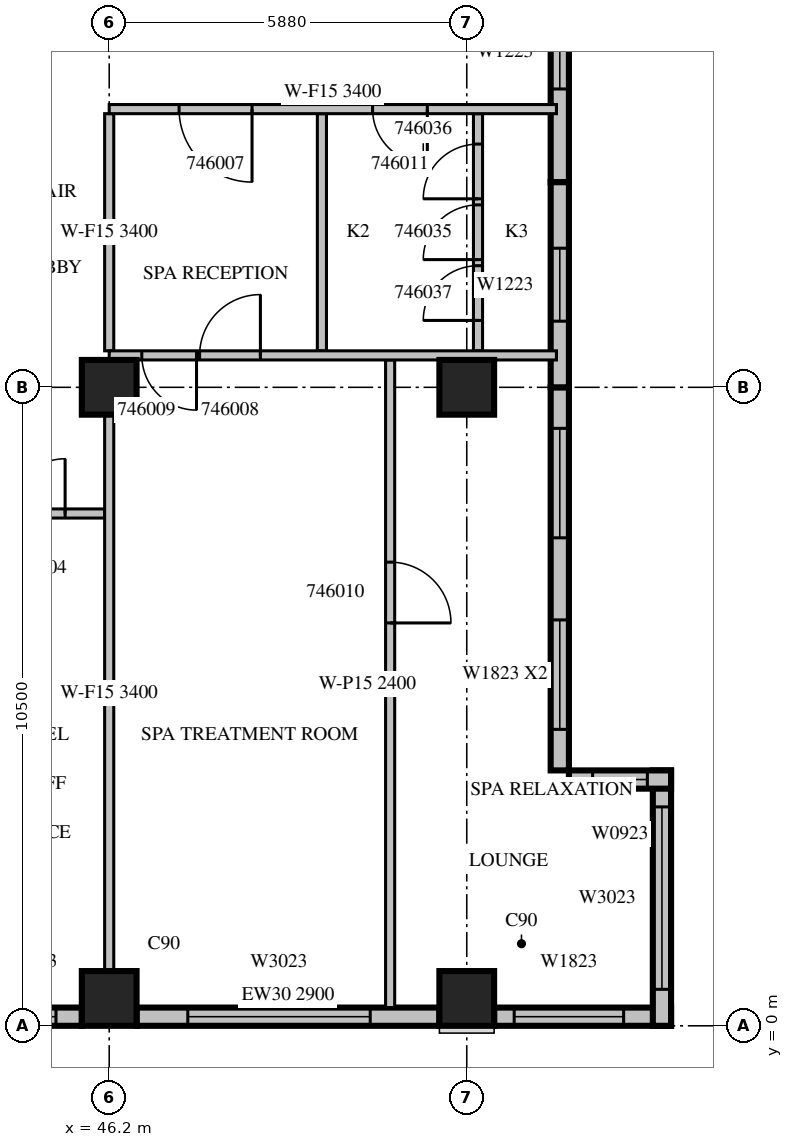
"""IFC4 building model, lengths in metres.
Left out: names, types, materials, properties, quantities, classifications, styles, units other than length and angle.
Written with IfcOpenShell. Run it as: python <this file> out.ifc"""

import sys

from ifc_helpers import new_model, si_unit, direction, frame, frame_2d, origin, origin_2d, place, context, subcontext, project, spatial, rectangle, extrude, source, transform, mapped, element, fill, save


model = new_model("IFC4")
c1 = context("Model", 3, precision=1e-05, world=origin(), true_north=direction((0.0, 1.0)))
c2 = subcontext(c1, "Body", "Model", "MODEL_VIEW")
j1 = project(units=[si_unit("LENGTHUNIT", "METRE"), si_unit("PLANEANGLEUNIT", "RADIAN")], contexts=[c1])
p1 = place(None, origin())
s1 = spatial("IfcSite", under=j1, at=p1, CompositionType="ELEMENT")
p2 = place(p1, origin())
s2 = spatial("IfcBuilding", under=s1, at=p2, CompositionType="ELEMENT")
p3 = place(p2, frame((0.0, 0.0, 208.2)))
s3 = spatial("IfcBuildingStorey", under=s2, at=p3, CompositionType="ELEMENT", Elevation=208.2)
m1 = source(origin(), c2, "Body", "SweptSolid", [
    extrude(rectangle(XDim=0.9, YDim=0.9, at=origin_2d()), origin(), (0.0, 0.0, 1.0), 3.8),
])
for number, where, z_axis, x_axis in (
    (1, (46.2, 0.45, 0.0), (0.0, 0.0, 1.0), (1.0, 0.0, 0.0)),
    (2, (52.08, 0.45, 0.0), (0.0, 0.0, 1.0), (1.0, 0.0, 0.0)),
    (3, (46.2, 10.5, 0.0), (0.0, 0.0, 1.0), (1.0, 0.0, 0.0)),
    (4, (52.08, 10.5, 0.0), (0.0, 0.0, 1.0), (1.0, 0.0, 0.0)),
):
    element("IfcColumn", number, at=place(p3, frame(where, z_axis=z_axis, x_axis=x_axis)), inside=s3, PredefinedType="COLUMN", context=c2, shape_type="MappedRepresentation", body=[
        mapped(m1, transform((0.0, 0.0, 0.0), scale=1.0)),
    ])
m2 = source(origin(), c2, "Body", "SweptSolid", [
    extrude(rectangle(XDim=1.75, YDim=0.3, at=frame_2d((0.875, 0.0))), origin(), (0.0, 0.0, 1.0), 3.4),
])
p4 = place(p3, frame((44.0, 0.15, 0.0), z_axis=(0.0, 0.0, 1.0), x_axis=(1.0, 0.0, 0.0)))
e5 = element("IfcWall", 5, at=p4, inside=s3, PredefinedType="STANDARD", context=c2, shape_type="MappedRepresentation", body=[
    mapped(m2, transform((0.0, 0.0, 0.0), scale=1.0)),
])
m3 = source(origin(), c2, "Body", "SweptSolid", [
    extrude(rectangle(XDim=0.9, YDim=2.3, at=frame_2d((0.45, 1.15))), frame((0.0, 0.16, 0.0), z_axis=(0.0, -1.0, 0.0), x_axis=(1.0, 0.0, 0.0)), (0.0, 0.0, 1.0), 0.32),
])
p5 = place(p4, frame((0.425, 0.0, 0.6)))
e6 = element("IfcOpeningElement", 6, at=p5, cuts=e5, PredefinedType="OPENING", context=c2, shape_type="MappedRepresentation", body=[
    mapped(m3, transform((0.0, 0.0, 0.0), scale=1.0)),
])
m4 = source(origin(), c2, "Body", "SweptSolid", [
    extrude(rectangle(XDim=4.98, YDim=0.3, at=frame_2d((2.49, 0.0))), origin(), (0.0, 0.0, 1.0), 2.9),
])
p6 = place(p3, frame((46.65, 0.15, 0.0), z_axis=(0.0, 0.0, 1.0), x_axis=(1.0, 0.0, 0.0)))
e7 = element("IfcWall", 7, at=p6, inside=s3, PredefinedType="STANDARD", context=c2, shape_type="MappedRepresentation", body=[
    mapped(m4, transform((0.0, 0.0, 0.0), scale=1.0)),
])
m5 = source(origin(), c2, "Body", "SweptSolid", [
    extrude(rectangle(XDim=3.0, YDim=2.3, at=frame_2d((1.5, 1.15))), frame((0.0, 0.16, 0.0), z_axis=(0.0, -1.0, 0.0), x_axis=(1.0, 0.0, 0.0)), (0.0, 0.0, 1.0), 0.32),
])
p7 = place(p6, frame((0.843, 0.0, 0.6)))
e8 = element("IfcOpeningElement", 8, at=p7, cuts=e7, PredefinedType="OPENING", context=c2, shape_type="MappedRepresentation", body=[
    mapped(m5, transform((0.0, 0.0, 0.0), scale=1.0)),
])
m6 = source(origin(), c2, "Body", "SweptSolid", [
    extrude(rectangle(XDim=2.91, YDim=0.3, at=frame_2d((1.455, 0.0))), origin(), (0.0, 0.0, 1.0), 3.4),
])
p8 = place(p3, frame((52.53, 0.15, 0.0), z_axis=(0.0, 0.0, 1.0), x_axis=(1.0, 0.0, 0.0)))
e9 = element("IfcWall", 9, at=p8, inside=s3, PredefinedType="STANDARD", context=c2, shape_type="MappedRepresentation", body=[
    mapped(m6, transform((0.0, 0.0, 0.0), scale=1.0)),
])
m7 = source(origin(), c2, "Body", "SweptSolid", [
    extrude(rectangle(XDim=1.8, YDim=2.3, at=frame_2d((0.9, 1.15))), frame((0.0, 0.16, 0.0), z_axis=(0.0, -1.0, 0.0), x_axis=(1.0, 0.0, 0.0)), (0.0, 0.0, 1.0), 0.32),
])
p9 = place(p8, frame((0.33, 0.0, 0.6)))
e10 = element("IfcOpeningElement", 10, at=p9, cuts=e9, PredefinedType="OPENING", context=c2, shape_type="MappedRepresentation", body=[
    mapped(m7, transform((0.0, 0.0, 0.0), scale=1.0)),
])
m8 = source(origin(), c2, "Body", "SweptSolid", [
    extrude(rectangle(XDim=4.2, YDim=0.3, at=frame_2d((2.1, 0.0))), origin(), (0.0, 0.0, 1.0), 3.4),
])
p10 = place(p3, frame((55.29, 0.0, 0.0), z_axis=(0.0, 0.0, 1.0), x_axis=(0.0, 1.0, 0.0)))
e11 = element("IfcWall", 11, at=p10, inside=s3, PredefinedType="STANDARD", context=c2, shape_type="MappedRepresentation", body=[
    mapped(m8, transform((0.0, 0.0, 0.0), scale=1.0)),
])
p11 = place(p10, frame((0.6, 0.0, 0.6)))
e12 = element("IfcOpeningElement", 12, at=p11, cuts=e11, PredefinedType="OPENING", context=c2, shape_type="MappedRepresentation", body=[
    mapped(m5, transform((0.0, 0.0, 0.0), scale=1.0)),
])
m9 = source(origin(), c2, "Body", "SweptSolid", [
    extrude(rectangle(XDim=1.68, YDim=0.3, at=frame_2d((0.84, 0.0))), origin(), (0.0, 0.0, 1.0), 3.4),
])
p12 = place(p3, frame((55.44, 4.05, 0.0), z_axis=(0.0, 0.0, 1.0), x_axis=(-1.0, 0.0, 0.0)))
e13 = element("IfcWall", 13, at=p12, inside=s3, PredefinedType="STANDARD", context=c2, shape_type="MappedRepresentation", body=[
    mapped(m9, transform((0.0, 0.0, 0.0), scale=1.0)),
])
p13 = place(p12, frame((0.39, 0.0, 0.6)))
e14 = element("IfcOpeningElement", 14, at=p13, cuts=e13, PredefinedType="OPENING", context=c2, shape_type="MappedRepresentation", body=[
    mapped(m3, transform((0.0, 0.0, 0.0), scale=1.0)),
])
m10 = source(origin(), c2, "Body", "SweptSolid", [
    extrude(rectangle(XDim=6.3, YDim=0.3, at=frame_2d((3.15, 0.0))), origin(), (0.0, 0.0, 1.0), 3.4),
])
p14 = place(p3, frame((53.61, 4.2, 0.0), z_axis=(0.0, 0.0, 1.0), x_axis=(0.0, 1.0, 0.0)))
e15 = element("IfcWall", 15, at=p14, inside=s3, PredefinedType="STANDARD", context=c2, shape_type="MappedRepresentation", body=[
    mapped(m10, transform((0.0, 0.0, 0.0), scale=1.0)),
])
p15 = place(p14, frame((0.675, 0.0, 0.6)))
e16 = element("IfcOpeningElement", 16, at=p15, cuts=e15, PredefinedType="OPENING", context=c2, shape_type="MappedRepresentation", body=[
    mapped(m7, transform((0.0, 0.0, 0.0), scale=1.0)),
])
p16 = place(p14, frame((3.825, 0.0, 0.6)))
e17 = element("IfcOpeningElement", 17, at=p16, cuts=e15, PredefinedType="OPENING", context=c2, shape_type="MappedRepresentation", body=[
    mapped(m7, transform((0.0, 0.0, 0.0), scale=1.0)),
])
m11 = source(origin(), c2, "Body", "SweptSolid", [
    extrude(rectangle(XDim=3.375, YDim=0.3, at=frame_2d((1.688, 0.0))), origin(), (0.0, 0.0, 1.0), 3.4),
])
p17 = place(p3, frame((53.61, 10.5, 0.0), z_axis=(0.0, 0.0, 1.0), x_axis=(0.0, 1.0, 0.0)))
e18 = element("IfcWall", 18, at=p17, inside=s3, PredefinedType="STANDARD", context=c2, shape_type="MappedRepresentation", body=[
    mapped(m11, transform((0.0, 0.0, 0.0), scale=1.0)),
])
m12 = source(origin(), c2, "Body", "SweptSolid", [
    extrude(rectangle(XDim=1.2, YDim=2.3, at=frame_2d((0.6, 1.15))), frame((0.0, 0.16, 0.0), z_axis=(0.0, -1.0, 0.0), x_axis=(1.0, 0.0, 0.0)), (0.0, 0.0, 1.0), 0.32),
])
p18 = place(p17, frame((1.087, 0.0, 0.6)))
e19 = element("IfcOpeningElement", 19, at=p18, cuts=e18, PredefinedType="OPENING", context=c2, shape_type="MappedRepresentation", body=[
    mapped(m12, transform((0.0, 0.0, 0.0), scale=1.0)),
])
p19 = place(p3, frame((53.61, 13.875, 0.0), z_axis=(0.0, 0.0, 1.0), x_axis=(0.0, 1.0, 0.0)))
e20 = element("IfcWall", 20, at=p19, inside=s3, PredefinedType="STANDARD", context=c2, shape_type="MappedRepresentation", body=[
    mapped(m11, transform((0.0, 0.0, 0.0), scale=1.0)),
])
p20 = place(p19, frame((1.531, 0.0, 0.6)))
e21 = element("IfcOpeningElement", 21, at=p20, cuts=e20, PredefinedType="OPENING", context=c2, shape_type="MappedRepresentation", body=[
    mapped(m12, transform((0.0, 0.0, 0.0), scale=1.0)),
])
m13 = source(origin(), c2, "Body", "SweptSolid", [
    extrude(rectangle(XDim=2.2, YDim=0.15, at=frame_2d((1.1, 0.0))), origin(), (0.0, 0.0, 1.0), 3.4),
])
p21 = place(p3, frame((46.125, 8.425, 0.0), z_axis=(0.0, 0.0, 1.0), x_axis=(-1.0, 0.0, 0.0)))
e22 = element("IfcWall", 22, at=p21, inside=s3, PredefinedType="PARTITIONING", context=c2, shape_type="MappedRepresentation", body=[
    mapped(m13, transform((0.0, 0.0, 0.0), scale=1.0)),
])
m14 = source(origin(), c2, "Body", "SweptSolid", [
    extrude(rectangle(XDim=0.9, YDim=2.1, at=frame_2d((0.45, 1.05))), frame((0.0, 0.085, 0.0), z_axis=(0.0, -1.0, 0.0), x_axis=(1.0, 0.0, 0.0)), (0.0, 0.0, 1.0), 0.17),
])
p22 = place(p21, frame((0.65, 0.0, 0.0)))
e23 = element("IfcOpeningElement", 23, at=p22, cuts=e22, PredefinedType="OPENING", context=c2, shape_type="MappedRepresentation", body=[
    mapped(m14, transform((0.0, 0.0, 0.0), scale=1.0)),
])
p23 = place(p3, frame((50.82, 0.3, 0.0), z_axis=(0.0, 0.0, 1.0), x_axis=(0.0, 1.0, 0.0)))
e24 = element("IfcWall", 24, at=p23, inside=s3, PredefinedType="PARTITIONING", context=c2, shape_type="SweptSolid", body=[
    extrude(rectangle(XDim=10.65, YDim=0.15, at=frame_2d((5.325, 0.0))), origin(), (0.0, 0.0, 1.0), 2.4),
])
m15 = source(origin(), c2, "Body", "SweptSolid", [
    extrude(rectangle(XDim=1.0, YDim=2.1, at=frame_2d((0.5, 1.05))), frame((0.0, 0.085, 0.0), z_axis=(0.0, -1.0, 0.0), x_axis=(1.0, 0.0, 0.0)), (0.0, 0.0, 1.0), 0.17),
])
p24 = place(p23, frame((6.325, 0.0, 0.0)))
e25 = element("IfcOpeningElement", 25, at=p24, cuts=e24, PredefinedType="OPENING", context=c2, shape_type="MappedRepresentation", body=[
    mapped(m15, transform((0.0, 0.0, 0.0), scale=1.0)),
])
m16 = source(origin(), c2, "Body", "SweptSolid", [
    extrude(rectangle(XDim=3.9, YDim=0.15, at=frame_2d((1.95, 0.0))), origin(), (0.0, 0.0, 1.0), 3.4),
])
p25 = place(p3, frame((49.698, 11.1, 0.0), z_axis=(0.0, 0.0, 1.0), x_axis=(0.0, 1.0, 0.0)))
e26 = element("IfcWall", 26, at=p25, inside=s3, PredefinedType="PARTITIONING", context=c2, shape_type="MappedRepresentation", body=[
    mapped(m16, transform((0.0, 0.0, 0.0), scale=1.0)),
])
p26 = place(p3, frame((52.265, 11.1, 0.0), z_axis=(0.0, 0.0, 1.0), x_axis=(0.0, 1.0, 0.0)))
e27 = element("IfcWall", 27, at=p26, inside=s3, PredefinedType="PARTITIONING", context=c2, shape_type="MappedRepresentation", body=[
    mapped(m16, transform((0.0, 0.0, 0.0), scale=1.0)),
])
p27 = place(p26, frame((1.5, 0.0, 0.0)))
e28 = element("IfcOpeningElement", 28, at=p27, cuts=e27, PredefinedType="OPENING", context=c2, shape_type="MappedRepresentation", body=[
    mapped(m14, transform((0.0, 0.0, 0.0), scale=1.0)),
])
p28 = place(p26, frame((2.5, 0.0, 0.0)))
e29 = element("IfcOpeningElement", 29, at=p28, cuts=e27, PredefinedType="OPENING", context=c2, shape_type="MappedRepresentation", body=[
    mapped(m14, transform((0.0, 0.0, 0.0), scale=1.0)),
])
p29 = place(p26, frame((0.5, 0.0, 0.0)))
e30 = element("IfcOpeningElement", 30, at=p29, cuts=e27, PredefinedType="OPENING", context=c2, shape_type="MappedRepresentation", body=[
    mapped(m14, transform((0.0, 0.0, 0.0), scale=1.0)),
])
m17 = source(origin(), c2, "Body", "SweptSolid", [
    extrude(rectangle(XDim=9.152, YDim=0.15, at=frame_2d((4.576, 0.0))), origin(), (0.0, 0.0, 1.0), 3.4),
])
p30 = place(p3, frame((46.2, 0.899, 0.0), z_axis=(0.0, 0.0, 1.0), x_axis=(0.0, 1.0, 0.0)))
e31 = element("IfcWall", 31, at=p30, inside=s3, PredefinedType="PARTITIONING", context=c2, shape_type="MappedRepresentation", body=[
    mapped(m17, transform((0.0, 0.0, 0.0), scale=1.0)),
])
p31 = place(p3, frame((46.2, 11.1, 0.0), z_axis=(0.0, 0.0, 1.0), x_axis=(0.0, 1.0, 0.0)))
e32 = element("IfcWall", 32, at=p31, inside=s3, PredefinedType="PARTITIONING", context=c2, shape_type="MappedRepresentation", body=[
    mapped(m16, transform((0.0, 0.0, 0.0), scale=1.0)),
])
m18 = source(origin(), c2, "Body", "SweptSolid", [
    extrude(rectangle(XDim=7.355, YDim=0.15, at=frame_2d((3.678, 0.0))), origin(), (0.0, 0.0, 1.0), 3.4),
])
p32 = place(p3, frame((53.555, 11.025, 0.0), z_axis=(0.0, 0.0, 1.0), x_axis=(-1.0, 0.0, 0.0)))
e33 = element("IfcWall", 33, at=p32, inside=s3, PredefinedType="PARTITIONING", context=c2, shape_type="MappedRepresentation", body=[
    mapped(m18, transform((0.0, 0.0, 0.0), scale=1.0)),
])
p33 = place(p32, frame((4.869, 0.0, 0.0)))
e34 = element("IfcOpeningElement", 34, at=p33, cuts=e33, PredefinedType="OPENING", context=c2, shape_type="MappedRepresentation", body=[
    mapped(m15, transform((0.0, 0.0, 0.0), scale=1.0)),
])
p34 = place(p32, frame((5.919, 0.0, 0.0)))
e35 = element("IfcOpeningElement", 35, at=p34, cuts=e33, PredefinedType="OPENING", context=c2, shape_type="MappedRepresentation", body=[
    mapped(m14, transform((0.0, 0.0, 0.0), scale=1.0)),
])
p35 = place(p3, frame((53.555, 15.075, 0.0), z_axis=(0.0, 0.0, 1.0), x_axis=(-1.0, 0.0, 0.0)))
e36 = element("IfcWall", 36, at=p35, inside=s3, PredefinedType="PARTITIONING", context=c2, shape_type="MappedRepresentation", body=[
    mapped(m18, transform((0.0, 0.0, 0.0), scale=1.0)),
])
m19 = source(origin(), c2, "Body", "SweptSolid", [
    extrude(rectangle(XDim=1.2, YDim=2.1, at=frame_2d((0.6, 1.05))), frame((0.0, 0.085, 0.0), z_axis=(0.0, -1.0, 0.0), x_axis=(1.0, 0.0, 0.0)), (0.0, 0.0, 1.0), 0.17),
])
p36 = place(p35, frame((5.006, 0.0, 0.0)))
e37 = element("IfcOpeningElement", 37, at=p36, cuts=e36, PredefinedType="OPENING", context=c2, shape_type="MappedRepresentation", body=[
    mapped(m19, transform((0.0, 0.0, 0.0), scale=1.0)),
])
p37 = place(p35, frame((2.124, 0.0, 0.0)))
e38 = element("IfcOpeningElement", 38, at=p37, cuts=e36, PredefinedType="OPENING", context=c2, shape_type="MappedRepresentation", body=[
    mapped(m14, transform((0.0, 0.0, 0.0), scale=1.0)),
])
m20 = source(origin(), c2, "Body", "SweptSolid", [
    extrude(rectangle(XDim=0.9, YDim=2.3, at=frame_2d((0.45, 1.15))), frame((0.0, 0.03, 0.0), z_axis=(0.0, -1.0, 0.0), x_axis=(1.0, 0.0, 0.0)), (0.0, 0.0, 1.0), 0.06),
])
p38 = place(p5, origin())
e39 = element("IfcWindow", 39, at=p38, inside=s3, PartitioningType="SINGLE_PANEL", PredefinedType="WINDOW", context=c2, shape_type="MappedRepresentation", body=[
    mapped(m20, transform((0.0, 0.0, 0.0), scale=1.0)),
])
fill(e6, e39)
m21 = source(origin(), c2, "Body", "SweptSolid", [
    extrude(rectangle(XDim=3.0, YDim=2.3, at=frame_2d((1.5, 1.15))), frame((0.0, 0.03, 0.0), z_axis=(0.0, -1.0, 0.0), x_axis=(1.0, 0.0, 0.0)), (0.0, 0.0, 1.0), 0.06),
])
p39 = place(p7, origin())
e40 = element("IfcWindow", 40, at=p39, inside=s3, PartitioningType="SINGLE_PANEL", PredefinedType="WINDOW", context=c2, shape_type="MappedRepresentation", body=[
    mapped(m21, transform((0.0, 0.0, 0.0), scale=1.0)),
])
fill(e8, e40)
m22 = source(origin(), c2, "Body", "SweptSolid", [
    extrude(rectangle(XDim=1.8, YDim=2.3, at=frame_2d((0.9, 1.15))), frame((0.0, 0.03, 0.0), z_axis=(0.0, -1.0, 0.0), x_axis=(1.0, 0.0, 0.0)), (0.0, 0.0, 1.0), 0.06),
])
p40 = place(p9, origin())
e41 = element("IfcWindow", 41, at=p40, inside=s3, PartitioningType="SINGLE_PANEL", PredefinedType="WINDOW", context=c2, shape_type="MappedRepresentation", body=[
    mapped(m22, transform((0.0, 0.0, 0.0), scale=1.0)),
])
fill(e10, e41)
p41 = place(p11, origin())
e42 = element("IfcWindow", 42, at=p41, inside=s3, PartitioningType="SINGLE_PANEL", PredefinedType="WINDOW", context=c2, shape_type="MappedRepresentation", body=[
    mapped(m21, transform((0.0, 0.0, 0.0), scale=1.0)),
])
fill(e12, e42)
p42 = place(p13, origin())
e43 = element("IfcWindow", 43, at=p42, inside=s3, PartitioningType="SINGLE_PANEL", PredefinedType="WINDOW", context=c2, shape_type="MappedRepresentation", body=[
    mapped(m20, transform((0.0, 0.0, 0.0), scale=1.0)),
])
fill(e14, e43)
p43 = place(p15, origin())
e44 = element("IfcWindow", 44, at=p43, inside=s3, PartitioningType="SINGLE_PANEL", PredefinedType="WINDOW", context=c2, shape_type="MappedRepresentation", body=[
    mapped(m22, transform((0.0, 0.0, 0.0), scale=1.0)),
])
fill(e16, e44)
p44 = place(p16, origin())
e45 = element("IfcWindow", 45, at=p44, inside=s3, PartitioningType="SINGLE_PANEL", PredefinedType="WINDOW", context=c2, shape_type="MappedRepresentation", body=[
    mapped(m22, transform((0.0, 0.0, 0.0), scale=1.0)),
])
fill(e17, e45)
m23 = source(origin(), c2, "Body", "SweptSolid", [
    extrude(rectangle(XDim=1.2, YDim=2.3, at=frame_2d((0.6, 1.15))), frame((0.0, 0.03, 0.0), z_axis=(0.0, -1.0, 0.0), x_axis=(1.0, 0.0, 0.0)), (0.0, 0.0, 1.0), 0.06),
])
p45 = place(p18, origin())
e46 = element("IfcWindow", 46, at=p45, inside=s3, PartitioningType="SINGLE_PANEL", PredefinedType="WINDOW", context=c2, shape_type="MappedRepresentation", body=[
    mapped(m23, transform((0.0, 0.0, 0.0), scale=1.0)),
])
fill(e19, e46)
p46 = place(p20, origin())
e47 = element("IfcWindow", 47, at=p46, inside=s3, PartitioningType="SINGLE_PANEL", PredefinedType="WINDOW", context=c2, shape_type="MappedRepresentation", body=[
    mapped(m23, transform((0.0, 0.0, 0.0), scale=1.0)),
])
fill(e21, e47)
m24 = source(origin(), c2, "Body", "SweptSolid", [
    extrude(rectangle(XDim=0.9, YDim=2.1, at=frame_2d((0.45, 1.05))), frame((0.0, 0.025, 0.0), z_axis=(0.0, -1.0, 0.0), x_axis=(1.0, 0.0, 0.0)), (0.0, 0.0, 1.0), 0.05),
])
p47 = place(p22, origin())
e48 = element("IfcDoor", 48, at=p47, inside=s3, OperationType="SINGLE_SWING_RIGHT", PredefinedType="DOOR", context=c2, shape_type="MappedRepresentation", body=[
    mapped(m24, transform((0.0, 0.0, 0.0), scale=1.0)),
])
fill(e23, e48)
m25 = source(origin(), c2, "Body", "SweptSolid", [
    extrude(rectangle(XDim=1.2, YDim=2.1, at=frame_2d((0.6, 1.05))), frame((0.0, 0.025, 0.0), z_axis=(0.0, -1.0, 0.0), x_axis=(1.0, 0.0, 0.0)), (0.0, 0.0, 1.0), 0.05),
])
p48 = place(p36, origin())
e49 = element("IfcDoor", 49, at=p48, inside=s3, OperationType="SINGLE_SWING_LEFT", PredefinedType="DOOR", context=c2, shape_type="MappedRepresentation", body=[
    mapped(m25, transform((0.0, 0.0, 0.0), scale=1.0)),
])
fill(e37, e49)
m26 = source(origin(), c2, "Body", "SweptSolid", [
    extrude(rectangle(XDim=1.0, YDim=2.1, at=frame_2d((0.5, 1.05))), frame((0.0, 0.025, 0.0), z_axis=(0.0, -1.0, 0.0), x_axis=(1.0, 0.0, 0.0)), (0.0, 0.0, 1.0), 0.05),
])
p49 = place(p33, origin())
e50 = element("IfcDoor", 50, at=p49, inside=s3, OperationType="SINGLE_SWING_RIGHT", PredefinedType="DOOR", context=c2, shape_type="MappedRepresentation", body=[
    mapped(m26, transform((0.0, 0.0, 0.0), scale=1.0)),
])
fill(e34, e50)
p50 = place(p34, origin())
e51 = element("IfcDoor", 51, at=p50, inside=s3, OperationType="SINGLE_SWING_LEFT", PredefinedType="DOOR", context=c2, shape_type="MappedRepresentation", body=[
    mapped(m24, transform((0.0, 0.0, 0.0), scale=1.0)),
])
fill(e35, e51)
p51 = place(p24, origin())
e52 = element("IfcDoor", 52, at=p51, inside=s3, OperationType="SINGLE_SWING_RIGHT", PredefinedType="DOOR", context=c2, shape_type="MappedRepresentation", body=[
    mapped(m26, transform((0.0, 0.0, 0.0), scale=1.0)),
])
fill(e25, e52)
p52 = place(p37, origin())
e53 = element("IfcDoor", 53, at=p52, inside=s3, OperationType="SINGLE_SWING_LEFT", PredefinedType="DOOR", context=c2, shape_type="MappedRepresentation", body=[
    mapped(m24, transform((0.0, 0.0, 0.0), scale=1.0)),
])
fill(e38, e53)
p53 = place(p27, origin())
e54 = element("IfcDoor", 54, at=p53, inside=s3, OperationType="SINGLE_SWING_LEFT", PredefinedType="DOOR", context=c2, shape_type="MappedRepresentation", body=[
    mapped(m24, transform((0.0, 0.0, 0.0), scale=1.0)),
])
fill(e28, e54)
p54 = place(p28, origin())
e55 = element("IfcDoor", 55, at=p54, inside=s3, OperationType="SINGLE_SWING_LEFT", PredefinedType="DOOR", context=c2, shape_type="MappedRepresentation", body=[
    mapped(m24, transform((0.0, 0.0, 0.0), scale=1.0)),
])
fill(e29, e55)
p55 = place(p29, origin())
e56 = element("IfcDoor", 56, at=p55, inside=s3, OperationType="SINGLE_SWING_LEFT", PredefinedType="DOOR", context=c2, shape_type="MappedRepresentation", body=[
    mapped(m24, transform((0.0, 0.0, 0.0), scale=1.0)),
])
fill(e30, e56)
save(model, sys.argv[1])
